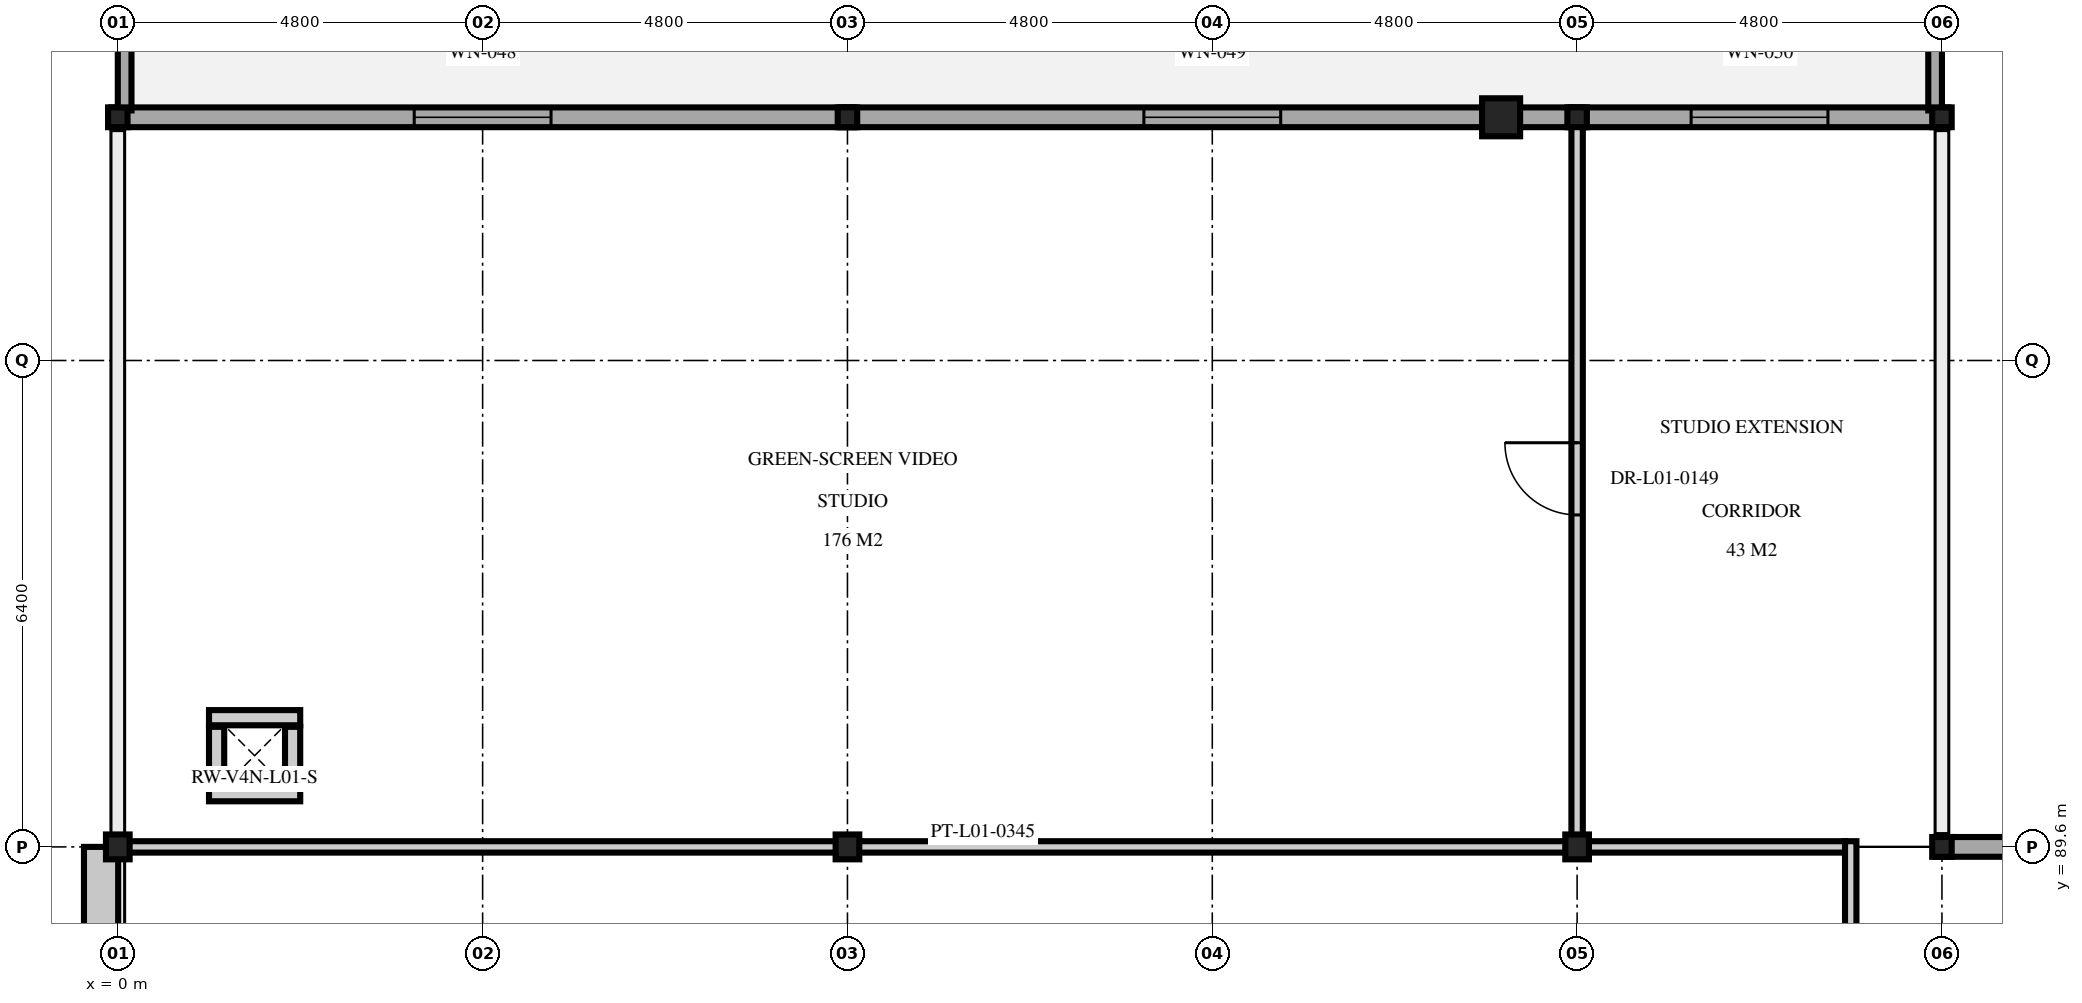
"""IFC4 building model, lengths in metres.
Left out: names, types, materials, properties, quantities, classifications, styles, units other than length and angle.
Written with IfcOpenShell. Run it as: python <this file> out.ifc"""

import sys

from ifc_helpers import new_model, si_unit, direction, frame, frame_2d, origin, origin_2d, place, context, subcontext, project, spatial, rectangle, i_section, extrude, element, fill, save


model = new_model("IFC4")
c1 = context("Model", 3, precision=1e-05, world=origin(), true_north=direction((0.0, 1.0)))
c2 = subcontext(c1, "Body", "Model", "MODEL_VIEW")
j1 = project(units=[si_unit("LENGTHUNIT", "METRE"), si_unit("PLANEANGLEUNIT", "RADIAN")], contexts=[c1])
p1 = place(None, origin())
s1 = spatial("IfcSite", under=j1, at=p1, CompositionType="ELEMENT")
p2 = place(p1, origin())
s2 = spatial("IfcBuilding", under=s1, at=p2, CompositionType="ELEMENT")
p3 = place(p2, frame((0.0, 0.0, 5.1)))
s3 = spatial("IfcBuildingStorey", under=s2, at=p3, CompositionType="ELEMENT", Elevation=5.1)
for number, where, z_axis, x_axis in (
    (1, (0.0, 89.6, 0.0), (0.0, 0.0, 1.0), (1.0, 0.0, 0.0)),
    (2, (9.6, 89.6, 0.0), (0.0, 0.0, 1.0), (1.0, 0.0, 0.0)),
    (3, (19.2, 89.6, 0.0), (0.0, 0.0, 1.0), (1.0, 0.0, 0.0)),
):
    element("IfcColumn", number, at=place(p3, frame(where, z_axis=z_axis, x_axis=x_axis)), inside=s3, PredefinedType="COLUMN", context=c2, shape_type="SweptSolid", body=[
        extrude(i_section(OverallWidth=0.311, OverallDepth=0.327, WebThickness=0.016, FlangeThickness=0.025, at=origin_2d()), origin(), (0.0, 0.0, 1.0), 4.5),
    ])
for number, where, z_axis, x_axis in (
    (4, (0.0, 99.2, 0.0), (0.0, 0.0, 1.0), (1.0, 0.0, 0.0)),
    (5, (9.6, 99.2, 0.0), (0.0, 0.0, 1.0), (1.0, 0.0, 0.0)),
    (6, (19.2, 99.2, 0.0), (0.0, 0.0, 1.0), (1.0, 0.0, 0.0)),
    (7, (24.0, 99.2, 0.0), (0.0, 0.0, 1.0), (1.0, 0.0, 0.0)),
    (8, (24.0, 89.6, 0.0), (0.0, 0.0, 1.0), (1.0, 0.0, 0.0)),
):
    element("IfcColumn", number, at=place(p3, frame(where, z_axis=z_axis, x_axis=x_axis)), inside=s3, PredefinedType="COLUMN", context=c2, shape_type="SweptSolid", body=[
        extrude(i_section(OverallWidth=0.256, OverallDepth=0.26, WebThickness=0.01, FlangeThickness=0.017, at=origin_2d()), origin(), (0.0, 0.0, 1.0), 4.5),
    ])
p4 = place(p3, frame((18.2, 99.2, 0.0), z_axis=(0.0, 0.0, 1.0), x_axis=(1.0, 0.0, 0.0)))
e9 = element("IfcColumn", 9, at=p4, inside=s3, PredefinedType="COLUMN", context=c2, shape_type="SweptSolid", body=[
    extrude(rectangle(XDim=0.5, YDim=0.5, at=origin_2d()), origin(), (0.0, 0.0, 1.0), 4.5),
])
for number, where, z_axis, x_axis in (
    (10, (2.4, 90.3, 0.0), (0.0, 0.0, 1.0), (-1.0, 0.0, 0.0)),
    (11, (1.2, 91.3, 0.0), (0.0, 0.0, 1.0), (1.0, 0.0, 0.0)),
):
    element("IfcWall", number, at=place(p3, frame(where, z_axis=z_axis, x_axis=x_axis)), inside=s3, PredefinedType="PARTITIONING", context=c2, shape_type="SweptSolid", body=[
        extrude(rectangle(XDim=1.2, YDim=0.2, at=frame_2d((0.6, 0.0))), origin(), (0.0, 0.0, 1.0), 3.79),
    ])
for number, where, z_axis, x_axis in (
    (12, (1.3, 90.42, 0.0), (0.0, 0.0, 1.0), (0.0, 1.0, 0.0)),
    (13, (2.3, 91.18, 0.0), (0.0, 0.0, 1.0), (0.0, -1.0, 0.0)),
):
    element("IfcWall", number, at=place(p3, frame(where, z_axis=z_axis, x_axis=x_axis)), inside=s3, PredefinedType="PARTITIONING", context=c2, shape_type="SweptSolid", body=[
        extrude(rectangle(XDim=0.76, YDim=0.2, at=frame_2d((0.38, 0.0))), origin(), (0.0, 0.0, 1.0), 3.79),
    ])
p5 = place(p3, frame((23.915, 89.6, 0.0), z_axis=(0.0, 0.0, 1.0), x_axis=(1.0, 0.0, 0.0)))
e14 = element("IfcWall", 14, at=p5, inside=s3, PredefinedType="SOLIDWALL", context=c2, shape_type="SweptSolid", body=[
    extrude(rectangle(XDim=4.97, YDim=0.26, at=frame_2d((2.485, 0.0))), origin(), (0.0, 0.0, 1.0), 3.765),
])
p6 = place(p3, frame((-0.085, 99.2, 0.0), z_axis=(0.0, 0.0, 1.0), x_axis=(1.0, 0.0, 0.0)))
e15 = element("IfcWall", 15, at=p6, inside=s3, PredefinedType="SOLIDWALL", context=c2, shape_type="SweptSolid", body=[
    extrude(rectangle(XDim=9.77, YDim=0.26, at=frame_2d((4.885, 0.0))), origin(), (0.0, 0.0, 1.0), 3.945),
])
p7 = place(p6, frame((3.985, 0.0, 1.0)))
e16 = element("IfcOpeningElement", 16, at=p7, cuts=e15, PredefinedType="OPENING", context=c2, shape_type="SweptSolid", body=[
    extrude(rectangle(XDim=1.8, YDim=2.1, at=frame_2d((0.9, 1.05))), frame((0.0, 0.14, 0.0), z_axis=(0.0, -1.0, 0.0), x_axis=(1.0, 0.0, 0.0)), (0.0, 0.0, 1.0), 0.28),
])
p8 = place(p3, frame((9.515, 99.2, 0.0), z_axis=(0.0, 0.0, 1.0), x_axis=(1.0, 0.0, 0.0)))
e17 = element("IfcWall", 17, at=p8, inside=s3, PredefinedType="SOLIDWALL", context=c2, shape_type="SweptSolid", body=[
    extrude(rectangle(XDim=9.77, YDim=0.26, at=frame_2d((4.885, 0.0))), origin(), (0.0, 0.0, 1.0), 3.945),
])
p9 = place(p8, frame((3.985, 0.0, 1.0)))
e18 = element("IfcOpeningElement", 18, at=p9, cuts=e17, PredefinedType="OPENING", context=c2, shape_type="SweptSolid", body=[
    extrude(rectangle(XDim=1.8, YDim=2.1, at=frame_2d((0.9, 1.05))), frame((0.0, 0.14, 0.0), z_axis=(0.0, -1.0, 0.0), x_axis=(1.0, 0.0, 0.0)), (0.0, 0.0, 1.0), 0.28),
])
p10 = place(p3, frame((19.115, 99.2, 0.0), z_axis=(0.0, 0.0, 1.0), x_axis=(1.0, 0.0, 0.0)))
e19 = element("IfcWall", 19, at=p10, inside=s3, PredefinedType="SOLIDWALL", context=c2, shape_type="SweptSolid", body=[
    extrude(rectangle(XDim=4.97, YDim=0.26, at=frame_2d((2.485, 0.0))), origin(), (0.0, 0.0, 1.0), 3.945),
])
p11 = place(p10, frame((1.585, 0.0, 1.0)))
e20 = element("IfcOpeningElement", 20, at=p11, cuts=e19, PredefinedType="OPENING", context=c2, shape_type="SweptSolid", body=[
    extrude(rectangle(XDim=1.8, YDim=2.1, at=frame_2d((0.9, 1.05))), frame((0.0, 0.14, 0.0), z_axis=(0.0, -1.0, 0.0), x_axis=(1.0, 0.0, 0.0)), (0.0, 0.0, 1.0), 0.28),
])
for number, where, z_axis, x_axis in (
    (21, (0.09, 99.29, 0.0), (0.0, 0.0, 1.0), (0.0, 1.0, 0.0)),
    (22, (23.91, 111.91, 0.0), (0.0, 0.0, 1.0), (0.0, -1.0, 0.0)),
):
    element("IfcWall", number, at=place(p3, frame(where, z_axis=z_axis, x_axis=x_axis)), inside=s3, PredefinedType="PARAPET", context=c2, shape_type="SweptSolid", body=[
        extrude(rectangle(XDim=12.62, YDim=0.18, at=frame_2d((6.31, 0.0))), origin(), (0.0, 0.0, 1.0), 0.45),
    ])
p12 = place(p3, frame((0.04, 89.6, 0.0), z_axis=(0.0, 0.0, 1.0), x_axis=(1.0, 0.0, 0.0)))
e23 = element("IfcWall", 23, at=p12, inside=s3, PredefinedType="PARTITIONING", context=c2, shape_type="SweptSolid", body=[
    extrude(rectangle(XDim=22.685, YDim=0.15, at=frame_2d((11.343, 0.0))), origin(), (0.0, 0.0, 1.0), 3.765),
])
p13 = place(p3, frame((22.8, 70.4, 0.0), z_axis=(0.0, 0.0, 1.0), x_axis=(0.0, 1.0, 0.0)))
e24 = element("IfcWall", 24, at=p13, inside=s3, PredefinedType="PARTITIONING", context=c2, shape_type="SweptSolid", body=[
    extrude(rectangle(XDim=19.275, YDim=0.15, at=frame_2d((9.638, 0.0))), origin(), (0.0, 0.0, 1.0), 3.765),
])
p14 = place(p13, frame((9.162, 0.0, 0.0)))
e25 = element("IfcOpeningElement", 25, at=p14, cuts=e24, PredefinedType="OPENING", context=c2, shape_type="SweptSolid", body=[
    extrude(rectangle(XDim=0.95, YDim=2.15, at=frame_2d((0.475, 1.075))), frame((0.0, 0.085, 0.0), z_axis=(0.0, -1.0, 0.0), x_axis=(1.0, 0.0, 0.0)), (0.0, 0.0, 1.0), 0.17),
])
p15 = place(p3, frame((19.2, 89.725, 0.0), z_axis=(0.0, 0.0, 1.0), x_axis=(0.0, 1.0, 0.0)))
e26 = element("IfcWall", 26, at=p15, inside=s3, PredefinedType="PARTITIONING", context=c2, shape_type="SweptSolid", body=[
    extrude(rectangle(XDim=9.435, YDim=0.15, at=frame_2d((4.717, 0.0))), origin(), (0.0, 0.0, 1.0), 3.765),
])
p16 = place(p15, frame((4.243, 0.0, 0.0)))
e27 = element("IfcOpeningElement", 27, at=p16, cuts=e26, PredefinedType="OPENING", context=c2, shape_type="SweptSolid", body=[
    extrude(rectangle(XDim=0.95, YDim=2.15, at=frame_2d((0.475, 1.075))), frame((0.0, 0.085, 0.0), z_axis=(0.0, -1.0, 0.0), x_axis=(1.0, 0.0, 0.0)), (0.0, 0.0, 1.0), 0.17),
])
p17 = place(p7, origin())
e28 = element("IfcWindow", 28, at=p17, inside=s3, PartitioningType="SINGLE_PANEL", PredefinedType="WINDOW", context=c2, shape_type="SweptSolid", body=[
    extrude(rectangle(XDim=1.8, YDim=2.1, at=frame_2d((0.9, 1.05))), frame((0.0, 0.03, 0.0), z_axis=(0.0, -1.0, 0.0), x_axis=(1.0, 0.0, 0.0)), (0.0, 0.0, 1.0), 0.06),
])
fill(e16, e28)
p18 = place(p9, origin())
e29 = element("IfcWindow", 29, at=p18, inside=s3, PartitioningType="SINGLE_PANEL", PredefinedType="WINDOW", context=c2, shape_type="SweptSolid", body=[
    extrude(rectangle(XDim=1.8, YDim=2.1, at=frame_2d((0.9, 1.05))), frame((0.0, 0.03, 0.0), z_axis=(0.0, -1.0, 0.0), x_axis=(1.0, 0.0, 0.0)), (0.0, 0.0, 1.0), 0.06),
])
fill(e18, e29)
p19 = place(p11, origin())
e30 = element("IfcWindow", 30, at=p19, inside=s3, PartitioningType="SINGLE_PANEL", PredefinedType="WINDOW", context=c2, shape_type="SweptSolid", body=[
    extrude(rectangle(XDim=1.8, YDim=2.1, at=frame_2d((0.9, 1.05))), frame((0.0, 0.03, 0.0), z_axis=(0.0, -1.0, 0.0), x_axis=(1.0, 0.0, 0.0)), (0.0, 0.0, 1.0), 0.06),
])
fill(e20, e30)
p20 = place(p16, origin())
e31 = element("IfcDoor", 31, at=p20, inside=s3, OperationType="SINGLE_SWING_RIGHT", PredefinedType="DOOR", context=c2, shape_type="SweptSolid", body=[
    extrude(rectangle(XDim=0.95, YDim=2.15, at=frame_2d((0.475, 1.075))), frame((0.0, 0.025, 0.0), z_axis=(0.0, -1.0, 0.0), x_axis=(1.0, 0.0, 0.0)), (0.0, 0.0, 1.0), 0.05),
])
fill(e27, e31)
save(model, sys.argv[1])
